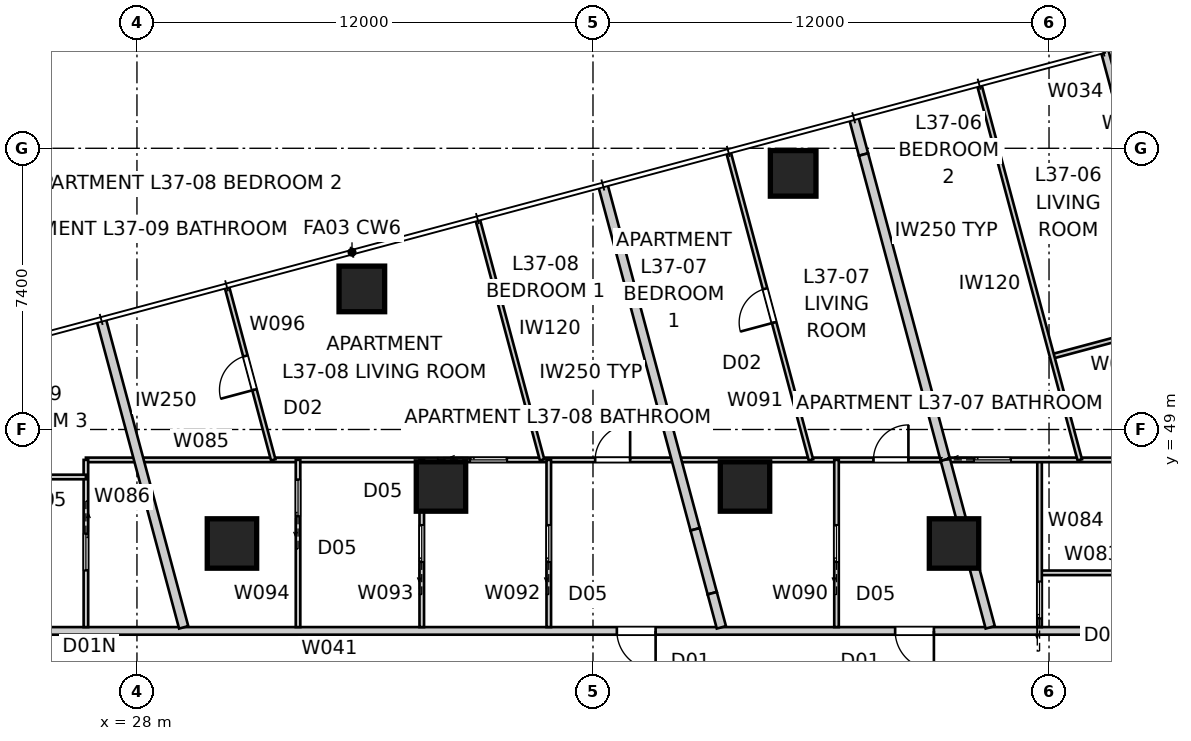
"""IFC4 building model, lengths in metres.
Left out: names, types, materials, properties, quantities, classifications, styles, units other than length and angle.
Written with IfcOpenShell. Run it as: python <this file> out.ifc"""

import sys

from ifc_helpers import new_model, si_unit, direction, frame, frame_2d, origin, origin_2d, place, context, subcontext, project, spatial, rectangle, extrude, element, fill, save


model = new_model("IFC4")
c1 = context("Model", 3, precision=1e-05, world=origin(), true_north=direction((0.0, 1.0)))
c2 = subcontext(c1, "Body", "Model", "MODEL_VIEW")
j1 = project(units=[si_unit("LENGTHUNIT", "METRE"), si_unit("PLANEANGLEUNIT", "RADIAN")], contexts=[c1])
p1 = place(None, origin())
s1 = spatial("IfcSite", under=j1, at=p1, CompositionType="ELEMENT")
p2 = place(p1, origin())
s2 = spatial("IfcBuilding", under=s1, at=p2, CompositionType="ELEMENT")
p3 = place(p2, frame((0.0, 0.0, 135.4)))
s3 = spatial("IfcBuildingStorey", under=s2, at=p3, CompositionType="ELEMENT", Elevation=135.4)
for number, where, z_axis, x_axis in (
    (1, (45.267, 55.74, 0.0), (0.0, 0.0, 1.0), (1.0, 0.0, 0.0)),
    (2, (33.918, 52.699, 0.0), (0.0, 0.0, 1.0), (1.0, 0.0, 0.0)),
):
    element("IfcColumn", number, at=place(p3, frame(where, z_axis=z_axis, x_axis=x_axis)), inside=s3, PredefinedType="COLUMN", context=c2, shape_type="SweptSolid", body=[
        extrude(rectangle(XDim=1.2, YDim=1.2, at=origin_2d()), origin(), (0.0, 0.0, 1.0), 3.2),
    ])
for number, where, z_axis, x_axis in (
    (3, (49.5, 46.0, 0.0), (0.0, 0.0, 1.0), (1.0, 0.0, 0.0)),
    (4, (44.0, 47.5, 0.0), (0.0, 0.0, 1.0), (1.0, 0.0, 0.0)),
    (5, (36.0, 47.5, 0.0), (0.0, 0.0, 1.0), (1.0, 0.0, 0.0)),
    (6, (30.5, 46.0, 0.0), (0.0, 0.0, 1.0), (1.0, 0.0, 0.0)),
):
    element("IfcColumn", number, at=place(p3, frame(where, z_axis=z_axis, x_axis=x_axis)), inside=s3, PredefinedType="COLUMN", context=c2, shape_type="SweptSolid", body=[
        extrude(rectangle(XDim=1.3, YDim=1.3, at=origin_2d()), origin(), (0.0, 0.0, 1.0), 3.4),
    ])
p4 = place(p3, frame((54.496, 55.107, 0.0), z_axis=(0.0, 0.0, 1.0), x_axis=(-0.258786931944, 0.965934430412, 0.0)))
e7 = element("IfcWall", 7, at=p4, inside=s3, PredefinedType="SOLIDWALL", context=c2, shape_type="SweptSolid", body=[
    extrude(rectangle(XDim=4.0, YDim=0.2, at=frame_2d((2.0, 0.0))), origin(), (0.0, 0.0, 1.0), 3.2),
])
p5 = place(p4, frame((1.0, 0.0, 0.4)))
e8 = element("IfcOpeningElement", 8, at=p5, cuts=e7, PredefinedType="OPENING", context=c2, shape_type="SweptSolid", body=[
    extrude(rectangle(XDim=2.0, YDim=1.8, at=frame_2d((1.0, 0.9))), frame((0.0, 0.11, 0.0), z_axis=(0.0, -1.0, 0.0), x_axis=(1.0, 0.0, 0.0)), (0.0, 0.0, 1.0), 0.22),
])
p6 = place(p3, frame((54.5, 43.7, 0.0), z_axis=(0.0, 0.0, 1.0), x_axis=(-1.0, 0.0, 0.0)))
e9 = element("IfcWall", 9, at=p6, inside=s3, PredefinedType="PARTITIONING", context=c2, shape_type="SweptSolid", body=[
    extrude(rectangle(XDim=29.0, YDim=0.2, at=frame_2d((14.5, 0.0))), origin(), (0.0, 0.0, 1.0), 3.2),
])
p7 = place(p6, frame((12.852, 0.0, 0.0)))
e10 = element("IfcOpeningElement", 10, at=p7, cuts=e9, PredefinedType="OPENING", context=c2, shape_type="SweptSolid", body=[
    extrude(rectangle(XDim=1.02, YDim=2.34, at=frame_2d((0.51, 1.17))), frame((0.0, 0.11, 0.0), z_axis=(0.0, -1.0, 0.0), x_axis=(1.0, 0.0, 0.0)), (0.0, 0.0, 1.0), 0.22),
])
p8 = place(p6, frame((5.529, 0.0, 0.0)))
e11 = element("IfcOpeningElement", 11, at=p8, cuts=e9, PredefinedType="OPENING", context=c2, shape_type="SweptSolid", body=[
    extrude(rectangle(XDim=1.02, YDim=2.34, at=frame_2d((0.51, 1.17))), frame((0.0, 0.11, 0.0), z_axis=(0.0, -1.0, 0.0), x_axis=(1.0, 0.0, 0.0)), (0.0, 0.0, 1.0), 0.22),
])
p9 = place(p3, frame((40.26, 55.434, 0.0), z_axis=(0.0, 0.0, 1.0), x_axis=(0.258809371168, -0.96592841836, 0.0)))
e12 = element("IfcWall", 12, at=p9, inside=s3, PredefinedType="PARTITIONING", context=c2, shape_type="SweptSolid", body=[
    extrude(rectangle(XDim=9.38, YDim=0.25, at=frame_2d((4.69, 0.0))), origin(), (0.0, 0.0, 1.0), 3.2),
])
p10 = place(p3, frame((42.687, 46.373, 0.0), z_axis=(0.0, 0.0, 1.0), x_axis=(0.258771138461, -0.965938661562, 0.0)))
e13 = element("IfcWall", 13, at=p10, inside=s3, PredefinedType="PARTITIONING", context=c2, shape_type="SweptSolid", body=[
    extrude(rectangle(XDim=1.741, YDim=0.25, at=frame_2d((0.87, 0.0))), origin(), (0.0, 0.0, 1.0), 2.672),
])
p11 = place(p3, frame((43.138, 44.692, 0.0), z_axis=(0.0, 0.0, 1.0), x_axis=(0.258937357067, -0.965894116928, 0.0)))
e14 = element("IfcWall", 14, at=p11, inside=s3, PredefinedType="PARTITIONING", context=c2, shape_type="SweptSolid", body=[
    extrude(rectangle(XDim=0.93, YDim=0.25, at=frame_2d((0.465, 0.0))), origin(), (0.0, 0.0, 1.0), 3.2),
])
p12 = place(p3, frame((27.058, 51.896, 0.0), z_axis=(0.0, 0.0, 1.0), x_axis=(0.258819975199, -0.96592557707, 0.0)))
e15 = element("IfcWall", 15, at=p12, inside=s3, PredefinedType="PARTITIONING", context=c2, shape_type="SweptSolid", body=[
    extrude(rectangle(XDim=8.389, YDim=0.25, at=frame_2d((4.194, 0.0))), origin(), (0.0, 0.0, 1.0), 3.2),
])
p13 = place(p3, frame((46.86, 57.202, 0.0), z_axis=(0.0, 0.0, 1.0), x_axis=(0.258817449225, -0.965926253902, 0.0)))
e16 = element("IfcWall", 16, at=p13, inside=s3, PredefinedType="PARTITIONING", context=c2, shape_type="SweptSolid", body=[
    extrude(rectangle(XDim=1.0, YDim=0.25, at=frame_2d((0.5, 0.0))), origin(), (0.0, 0.0, 1.0), 3.2),
])
p14 = place(p3, frame((47.119, 56.237, 0.0), z_axis=(0.0, 0.0, 1.0), x_axis=(0.258819249667, -0.965925771476, 0.0)))
e17 = element("IfcWall", 17, at=p14, inside=s3, PredefinedType="PARTITIONING", context=c2, shape_type="SweptSolid", body=[
    extrude(rectangle(XDim=8.315, YDim=0.25, at=frame_2d((4.158, 0.0))), origin(), (0.0, 0.0, 1.0), 2.588),
])
p15 = place(p3, frame((49.271, 48.205, 0.0), z_axis=(0.0, 0.0, 1.0), x_axis=(0.258853660469, -0.965916550465, 0.0)))
e18 = element("IfcWall", 18, at=p15, inside=s3, PredefinedType="PARTITIONING", context=c2, shape_type="SweptSolid", body=[
    extrude(rectangle(XDim=4.567, YDim=0.25, at=frame_2d((2.283, 0.0))), origin(), (0.0, 0.0, 1.0), 3.2),
])
p16 = place(p3, frame((51.751, 45.228, 0.0), z_axis=(0.0, 0.0, 1.0), x_axis=(1.0, 0.0, 0.0)))
e19 = element("IfcWall", 19, at=p16, inside=s3, PredefinedType="PARTITIONING", context=c2, shape_type="SweptSolid", body=[
    extrude(rectangle(XDim=6.449, YDim=0.12, at=frame_2d((3.225, 0.0))), origin(), (0.0, 0.0, 1.0), 3.2),
])
p17 = place(p16, frame((2.764, 0.0, 0.0)))
e20 = element("IfcOpeningElement", 20, at=p17, cuts=e19, PredefinedType="OPENING", context=c2, shape_type="SweptSolid", body=[
    extrude(rectangle(XDim=0.92, YDim=2.34, at=frame_2d((0.46, 1.17))), frame((0.0, 0.07, 0.0), z_axis=(0.0, -1.0, 0.0), x_axis=(1.0, 0.0, 0.0)), (0.0, 0.0, 1.0), 0.14),
])
p18 = place(p3, frame((51.751, 43.8, 0.0), z_axis=(0.0, 0.0, 1.0), x_axis=(0.0, 1.0, 0.0)))
e21 = element("IfcWall", 21, at=p18, inside=s3, PredefinedType="PARTITIONING", context=c2, shape_type="SweptSolid", body=[
    extrude(rectangle(XDim=4.4, YDim=0.12, at=frame_2d((2.2, 0.0))), origin(), (0.0, 0.0, 1.0), 3.2),
])
p19 = place(p18, frame((0.234, 0.0, 0.0)))
e22 = element("IfcOpeningElement", 22, at=p19, cuts=e21, PredefinedType="OPENING", context=c2, shape_type="SweptSolid", body=[
    extrude(rectangle(XDim=0.96, YDim=2.0, at=frame_2d((0.48, 1.0))), frame((0.0, 0.07, 0.0), z_axis=(0.0, -1.0, 0.0), x_axis=(1.0, 0.0, 0.0)), (0.0, 0.0, 1.0), 0.14),
])
p20 = place(p3, frame((26.657, 48.2, 0.0), z_axis=(0.0, 0.0, 1.0), x_axis=(1.0, 0.0, 0.0)))
e23 = element("IfcWall", 23, at=p20, inside=s3, PredefinedType="PARTITIONING", context=c2, shape_type="SweptSolid", body=[
    extrude(rectangle(XDim=31.543, YDim=0.12, at=frame_2d((15.771, 0.0))), origin(), (0.0, 0.0, 1.0), 2.399),
])
p21 = place(p20, frame((13.4, 0.0, 0.0)))
e24 = element("IfcOpeningElement", 24, at=p21, cuts=e23, PredefinedType="OPENING", context=c2, shape_type="SweptSolid", body=[
    extrude(rectangle(XDim=0.92, YDim=2.34, at=frame_2d((0.46, 1.17))), frame((0.0, 0.07, 0.0), z_axis=(0.0, -1.0, 0.0), x_axis=(1.0, 0.0, 0.0)), (0.0, 0.0, 1.0), 0.14),
])
p22 = place(p20, frame((20.723, 0.0, 0.0)))
e25 = element("IfcOpeningElement", 25, at=p22, cuts=e23, PredefinedType="OPENING", context=c2, shape_type="SweptSolid", body=[
    extrude(rectangle(XDim=0.92, YDim=2.34, at=frame_2d((0.46, 1.17))), frame((0.0, 0.07, 0.0), z_axis=(0.0, -1.0, 0.0), x_axis=(1.0, 0.0, 0.0)), (0.0, 0.0, 1.0), 0.14),
])
p23 = place(p20, frame((10.117, 0.0, 0.0)))
e26 = element("IfcOpeningElement", 26, at=p23, cuts=e23, PredefinedType="OPENING", context=c2, shape_type="SweptSolid", body=[
    extrude(rectangle(XDim=0.96, YDim=2.1, at=frame_2d((0.48, 1.05))), frame((0.0, 0.07, 0.0), z_axis=(0.0, -1.0, 0.0), x_axis=(1.0, 0.0, 0.0)), (0.0, 0.0, 1.0), 0.14),
])
p24 = place(p20, frame((28.362, 0.0, 0.0)))
e27 = element("IfcOpeningElement", 27, at=p24, cuts=e23, PredefinedType="OPENING", context=c2, shape_type="SweptSolid", body=[
    extrude(rectangle(XDim=0.92, YDim=2.34, at=frame_2d((0.46, 1.17))), frame((0.0, 0.07, 0.0), z_axis=(0.0, -1.0, 0.0), x_axis=(1.0, 0.0, 0.0)), (0.0, 0.0, 1.0), 0.14),
])
p25 = place(p20, frame((23.375, 0.0, 0.0)))
e28 = element("IfcOpeningElement", 28, at=p25, cuts=e23, PredefinedType="OPENING", context=c2, shape_type="SweptSolid", body=[
    extrude(rectangle(XDim=0.96, YDim=2.1, at=frame_2d((0.48, 1.05))), frame((0.0, 0.07, 0.0), z_axis=(0.0, -1.0, 0.0), x_axis=(1.0, 0.0, 0.0)), (0.0, 0.0, 1.0), 0.14),
])
p26 = place(p3, frame((59.205, 52.832, 0.0), z_axis=(0.0, 0.0, 1.0), x_axis=(-0.965926630377, -0.258816044185, 0.0)))
e29 = element("IfcWall", 29, at=p26, inside=s3, PredefinedType="PARTITIONING", context=c2, shape_type="SweptSolid", body=[
    extrude(rectangle(XDim=7.377, YDim=0.12, at=frame_2d((3.688, 0.0))), origin(), (0.0, 0.0, 1.0), 3.2),
])
p27 = place(p26, frame((3.208, 0.0, 0.0)))
e30 = element("IfcOpeningElement", 30, at=p27, cuts=e29, PredefinedType="OPENING", context=c2, shape_type="SweptSolid", body=[
    extrude(rectangle(XDim=0.92, YDim=2.34, at=frame_2d((0.46, 1.17))), frame((0.0, 0.07, 0.0), z_axis=(0.0, -1.0, 0.0), x_axis=(1.0, 0.0, 0.0)), (0.0, 0.0, 1.0), 0.14),
])
p28 = place(p3, frame((52.809, 48.2, 0.0), z_axis=(0.0, 0.0, 1.0), x_axis=(-0.258829444594, 0.965923039694, 0.0)))
e31 = element("IfcWall", 31, at=p28, inside=s3, PredefinedType="PARTITIONING", context=c2, shape_type="SweptSolid", body=[
    extrude(rectangle(XDim=10.196, YDim=0.12, at=frame_2d((5.098, 0.0))), origin(), (0.0, 0.0, 1.0), 3.2),
])
p29 = place(p3, frame((46.408, 43.8, 0.0), z_axis=(0.0, 0.0, 1.0), x_axis=(0.0, 1.0, 0.0)))
e32 = element("IfcWall", 32, at=p29, inside=s3, PredefinedType="PARTITIONING", context=c2, shape_type="SweptSolid", body=[
    extrude(rectangle(XDim=4.4, YDim=0.12, at=frame_2d((2.2, 0.0))), origin(), (0.0, 0.0, 1.0), 3.2),
])
p30 = place(p29, frame((1.72, 0.0, 0.0)))
e33 = element("IfcOpeningElement", 33, at=p30, cuts=e32, PredefinedType="OPENING", context=c2, shape_type="SweptSolid", body=[
    extrude(rectangle(XDim=0.96, YDim=2.1, at=frame_2d((0.48, 1.05))), frame((0.0, 0.07, 0.0), z_axis=(0.0, -1.0, 0.0), x_axis=(1.0, 0.0, 0.0)), (0.0, 0.0, 1.0), 0.14),
])
p31 = place(p3, frame((45.735, 48.2, 0.0), z_axis=(0.0, 0.0, 1.0), x_axis=(-0.258805140981, 0.96592955178, 0.0)))
e34 = element("IfcWall", 34, at=p31, inside=s3, PredefinedType="PARTITIONING", context=c2, shape_type="SweptSolid", body=[
    extrude(rectangle(XDim=8.365, YDim=0.12, at=frame_2d((4.182, 0.0))), origin(), (0.0, 0.0, 1.0), 3.2),
])
p32 = place(p31, frame((3.742, 0.0, 0.0)))
e35 = element("IfcOpeningElement", 35, at=p32, cuts=e34, PredefinedType="OPENING", context=c2, shape_type="SweptSolid", body=[
    extrude(rectangle(XDim=0.92, YDim=2.34, at=frame_2d((0.46, 1.17))), frame((0.0, 0.07, 0.0), z_axis=(0.0, -1.0, 0.0), x_axis=(1.0, 0.0, 0.0)), (0.0, 0.0, 1.0), 0.14),
])
p33 = place(p3, frame((38.837, 43.8, 0.0), z_axis=(0.0, 0.0, 1.0), x_axis=(0.0, 1.0, 0.0)))
e36 = element("IfcWall", 36, at=p33, inside=s3, PredefinedType="PARTITIONING", context=c2, shape_type="SweptSolid", body=[
    extrude(rectangle(XDim=4.4, YDim=0.12, at=frame_2d((2.2, 0.0))), origin(), (0.0, 0.0, 1.0), 3.2),
])
p34 = place(p33, frame((1.72, 0.0, 0.0)))
e37 = element("IfcOpeningElement", 37, at=p34, cuts=e36, PredefinedType="OPENING", context=c2, shape_type="SweptSolid", body=[
    extrude(rectangle(XDim=0.96, YDim=2.1, at=frame_2d((0.48, 1.05))), frame((0.0, 0.07, 0.0), z_axis=(0.0, -1.0, 0.0), x_axis=(1.0, 0.0, 0.0)), (0.0, 0.0, 1.0), 0.14),
])
p35 = place(p3, frame((35.494, 43.8, 0.0), z_axis=(0.0, 0.0, 1.0), x_axis=(0.0, 1.0, 0.0)))
e38 = element("IfcWall", 38, at=p35, inside=s3, PredefinedType="PARTITIONING", context=c2, shape_type="SweptSolid", body=[
    extrude(rectangle(XDim=4.4, YDim=0.12, at=frame_2d((2.2, 0.0))), origin(), (0.0, 0.0, 1.0), 3.2),
])
p36 = place(p35, frame((1.72, 0.0, 0.0)))
e39 = element("IfcOpeningElement", 39, at=p36, cuts=e38, PredefinedType="OPENING", context=c2, shape_type="SweptSolid", body=[
    extrude(rectangle(XDim=0.96, YDim=2.1, at=frame_2d((0.48, 1.05))), frame((0.0, 0.07, 0.0), z_axis=(0.0, -1.0, 0.0), x_axis=(1.0, 0.0, 0.0)), (0.0, 0.0, 1.0), 0.14),
])
p37 = place(p3, frame((32.239, 43.8, 0.0), z_axis=(0.0, 0.0, 1.0), x_axis=(0.0, 1.0, 0.0)))
e40 = element("IfcWall", 40, at=p37, inside=s3, PredefinedType="PARTITIONING", context=c2, shape_type="SweptSolid", body=[
    extrude(rectangle(XDim=4.4, YDim=0.12, at=frame_2d((2.2, 0.0))), origin(), (0.0, 0.0, 1.0), 3.2),
])
p38 = place(p37, frame((2.92, 0.0, 0.0)))
e41 = element("IfcOpeningElement", 41, at=p38, cuts=e40, PredefinedType="OPENING", context=c2, shape_type="SweptSolid", body=[
    extrude(rectangle(XDim=0.96, YDim=2.1, at=frame_2d((0.48, 1.05))), frame((0.0, 0.07, 0.0), z_axis=(0.0, -1.0, 0.0), x_axis=(1.0, 0.0, 0.0)), (0.0, 0.0, 1.0), 0.14),
])
p39 = place(p3, frame((36.969, 54.511, 0.0), z_axis=(0.0, 0.0, 1.0), x_axis=(0.258846285554, -0.96591852682, 0.0)))
e42 = element("IfcWall", 42, at=p39, inside=s3, PredefinedType="PARTITIONING", context=c2, shape_type="SweptSolid", body=[
    extrude(rectangle(XDim=6.533, YDim=0.12, at=frame_2d((3.267, 0.0))), origin(), (0.0, 0.0, 1.0), 3.2),
])
p40 = place(p3, frame((31.586, 48.2, 0.0), z_axis=(0.0, 0.0, 1.0), x_axis=(-0.258809612631, 0.965928353663, 0.0)))
e43 = element("IfcWall", 43, at=p40, inside=s3, PredefinedType="PARTITIONING", context=c2, shape_type="SweptSolid", body=[
    extrude(rectangle(XDim=4.702, YDim=0.12, at=frame_2d((2.351, 0.0))), origin(), (0.0, 0.0, 1.0), 3.2),
])
p41 = place(p40, frame((1.911, 0.0, 0.0)))
e44 = element("IfcOpeningElement", 44, at=p41, cuts=e43, PredefinedType="OPENING", context=c2, shape_type="SweptSolid", body=[
    extrude(rectangle(XDim=0.92, YDim=2.34, at=frame_2d((0.46, 1.17))), frame((0.0, 0.07, 0.0), z_axis=(0.0, -1.0, 0.0), x_axis=(1.0, 0.0, 0.0)), (0.0, 0.0, 1.0), 0.14),
])
p42 = place(p3, frame((21.8, 47.75, 0.0), z_axis=(0.0, 0.0, 1.0), x_axis=(1.0, 0.0, 0.0)))
e45 = element("IfcWall", 45, at=p42, inside=s3, PredefinedType="PARTITIONING", context=c2, shape_type="SweptSolid", body=[
    extrude(rectangle(XDim=4.857, YDim=0.12, at=frame_2d((2.428, 0.0))), origin(), (0.0, 0.0, 1.0), 3.2),
])
p43 = place(p42, frame((1.969, 0.0, 0.0)))
e46 = element("IfcOpeningElement", 46, at=p43, cuts=e45, PredefinedType="OPENING", context=c2, shape_type="SweptSolid", body=[
    extrude(rectangle(XDim=0.92, YDim=2.34, at=frame_2d((0.46, 1.17))), frame((0.0, 0.07, 0.0), z_axis=(0.0, -1.0, 0.0), x_axis=(1.0, 0.0, 0.0)), (0.0, 0.0, 1.0), 0.14),
])
p44 = place(p3, frame((26.657, 48.2, 0.0), z_axis=(0.0, 0.0, 1.0), x_axis=(0.0, -1.0, 0.0)))
e47 = element("IfcWall", 47, at=p44, inside=s3, PredefinedType="PARTITIONING", context=c2, shape_type="SweptSolid", body=[
    extrude(rectangle(XDim=4.4, YDim=0.12, at=frame_2d((2.2, 0.0))), origin(), (0.0, 0.0, 1.0), 3.2),
])
p45 = place(p44, frame((1.945, 0.0, 0.0)))
e48 = element("IfcOpeningElement", 48, at=p45, cuts=e47, PredefinedType="OPENING", context=c2, shape_type="SweptSolid", body=[
    extrude(rectangle(XDim=0.96, YDim=2.1, at=frame_2d((0.48, 1.05))), frame((0.0, 0.07, 0.0), z_axis=(0.0, -1.0, 0.0), x_axis=(1.0, 0.0, 0.0)), (0.0, 0.0, 1.0), 0.14),
])
p46 = place(p7, origin())
e49 = element("IfcDoor", 49, at=p46, inside=s3, OperationType="SINGLE_SWING_LEFT", PredefinedType="DOOR", context=c2, shape_type="SweptSolid", body=[
    extrude(rectangle(XDim=1.02, YDim=2.34, at=frame_2d((0.51, 1.17))), frame((0.0, 0.025, 0.0), z_axis=(0.0, -1.0, 0.0), x_axis=(1.0, 0.0, 0.0)), (0.0, 0.0, 1.0), 0.05),
])
fill(e10, e49)
p47 = place(p8, origin())
e50 = element("IfcDoor", 50, at=p47, inside=s3, OperationType="SINGLE_SWING_LEFT", PredefinedType="DOOR", context=c2, shape_type="SweptSolid", body=[
    extrude(rectangle(XDim=1.02, YDim=2.34, at=frame_2d((0.51, 1.17))), frame((0.0, 0.025, 0.0), z_axis=(0.0, -1.0, 0.0), x_axis=(1.0, 0.0, 0.0)), (0.0, 0.0, 1.0), 0.05),
])
fill(e11, e50)
p48 = place(p34, origin())
e51 = element("IfcDoor", 51, at=p48, inside=s3, OperationType="SLIDING_TO_LEFT", PredefinedType="DOOR", context=c2, shape_type="SweptSolid", body=[
    extrude(rectangle(XDim=0.96, YDim=2.1, at=frame_2d((0.48, 1.05))), frame((0.0, 0.025, 0.0), z_axis=(0.0, -1.0, 0.0), x_axis=(1.0, 0.0, 0.0)), (0.0, 0.0, 1.0), 0.05),
])
fill(e37, e51)
p49 = place(p21, origin())
e52 = element("IfcDoor", 52, at=p49, inside=s3, OperationType="SINGLE_SWING_RIGHT", PredefinedType="DOOR", context=c2, shape_type="SweptSolid", body=[
    extrude(rectangle(XDim=0.92, YDim=2.34, at=frame_2d((0.46, 1.17))), frame((0.0, 0.025, 0.0), z_axis=(0.0, -1.0, 0.0), x_axis=(1.0, 0.0, 0.0)), (0.0, 0.0, 1.0), 0.05),
])
fill(e24, e52)
p50 = place(p30, origin())
e53 = element("IfcDoor", 53, at=p50, inside=s3, OperationType="SLIDING_TO_LEFT", PredefinedType="DOOR", context=c2, shape_type="SweptSolid", body=[
    extrude(rectangle(XDim=0.96, YDim=2.1, at=frame_2d((0.48, 1.05))), frame((0.0, 0.025, 0.0), z_axis=(0.0, -1.0, 0.0), x_axis=(1.0, 0.0, 0.0)), (0.0, 0.0, 1.0), 0.05),
])
fill(e33, e53)
p51 = place(p22, origin())
e54 = element("IfcDoor", 54, at=p51, inside=s3, OperationType="SINGLE_SWING_RIGHT", PredefinedType="DOOR", context=c2, shape_type="SweptSolid", body=[
    extrude(rectangle(XDim=0.92, YDim=2.34, at=frame_2d((0.46, 1.17))), frame((0.0, 0.025, 0.0), z_axis=(0.0, -1.0, 0.0), x_axis=(1.0, 0.0, 0.0)), (0.0, 0.0, 1.0), 0.05),
])
fill(e25, e54)
p52 = place(p45, origin())
e55 = element("IfcDoor", 55, at=p52, inside=s3, OperationType="SLIDING_TO_LEFT", PredefinedType="DOOR", context=c2, shape_type="SweptSolid", body=[
    extrude(rectangle(XDim=0.96, YDim=2.1, at=frame_2d((0.48, 1.05))), frame((0.0, 0.025, 0.0), z_axis=(0.0, -1.0, 0.0), x_axis=(1.0, 0.0, 0.0)), (0.0, 0.0, 1.0), 0.05),
])
fill(e48, e55)
p53 = place(p19, origin())
e56 = element("IfcDoor", 56, at=p53, inside=s3, OperationType="SLIDING_TO_LEFT", PredefinedType="DOOR", context=c2, shape_type="SweptSolid", body=[
    extrude(rectangle(XDim=0.96, YDim=2.0, at=frame_2d((0.48, 1.0))), frame((0.0, 0.025, 0.0), z_axis=(0.0, -1.0, 0.0), x_axis=(1.0, 0.0, 0.0)), (0.0, 0.0, 1.0), 0.05),
])
fill(e22, e56)
p54 = place(p36, origin())
e57 = element("IfcDoor", 57, at=p54, inside=s3, OperationType="SLIDING_TO_LEFT", PredefinedType="DOOR", context=c2, shape_type="SweptSolid", body=[
    extrude(rectangle(XDim=0.96, YDim=2.1, at=frame_2d((0.48, 1.05))), frame((0.0, 0.025, 0.0), z_axis=(0.0, -1.0, 0.0), x_axis=(1.0, 0.0, 0.0)), (0.0, 0.0, 1.0), 0.05),
])
fill(e39, e57)
p55 = place(p23, origin())
e58 = element("IfcDoor", 58, at=p55, inside=s3, OperationType="SLIDING_TO_LEFT", PredefinedType="DOOR", context=c2, shape_type="SweptSolid", body=[
    extrude(rectangle(XDim=0.96, YDim=2.1, at=frame_2d((0.48, 1.05))), frame((0.0, 0.025, 0.0), z_axis=(0.0, -1.0, 0.0), x_axis=(1.0, 0.0, 0.0)), (0.0, 0.0, 1.0), 0.05),
])
fill(e26, e58)
p56 = place(p32, origin())
e59 = element("IfcDoor", 59, at=p56, inside=s3, OperationType="SINGLE_SWING_LEFT", PredefinedType="DOOR", context=c2, shape_type="SweptSolid", body=[
    extrude(rectangle(XDim=0.92, YDim=2.34, at=frame_2d((0.46, 1.17))), frame((0.0, 0.025, 0.0), z_axis=(0.0, -1.0, 0.0), x_axis=(1.0, 0.0, 0.0)), (0.0, 0.0, 1.0), 0.05),
])
fill(e35, e59)
p57 = place(p25, origin())
e60 = element("IfcDoor", 60, at=p57, inside=s3, OperationType="SLIDING_TO_LEFT", PredefinedType="DOOR", context=c2, shape_type="SweptSolid", body=[
    extrude(rectangle(XDim=0.96, YDim=2.1, at=frame_2d((0.48, 1.05))), frame((0.0, 0.025, 0.0), z_axis=(0.0, -1.0, 0.0), x_axis=(1.0, 0.0, 0.0)), (0.0, 0.0, 1.0), 0.05),
])
fill(e28, e60)
p58 = place(p38, origin())
e61 = element("IfcDoor", 61, at=p58, inside=s3, OperationType="SLIDING_TO_LEFT", PredefinedType="DOOR", context=c2, shape_type="SweptSolid", body=[
    extrude(rectangle(XDim=0.96, YDim=2.1, at=frame_2d((0.48, 1.05))), frame((0.0, 0.025, 0.0), z_axis=(0.0, -1.0, 0.0), x_axis=(1.0, 0.0, 0.0)), (0.0, 0.0, 1.0), 0.05),
])
fill(e41, e61)
p59 = place(p41, origin())
e62 = element("IfcDoor", 62, at=p59, inside=s3, OperationType="SINGLE_SWING_LEFT", PredefinedType="DOOR", context=c2, shape_type="SweptSolid", body=[
    extrude(rectangle(XDim=0.92, YDim=2.34, at=frame_2d((0.46, 1.17))), frame((0.0, 0.025, 0.0), z_axis=(0.0, -1.0, 0.0), x_axis=(1.0, 0.0, 0.0)), (0.0, 0.0, 1.0), 0.05),
])
fill(e44, e62)
save(model, sys.argv[1])
